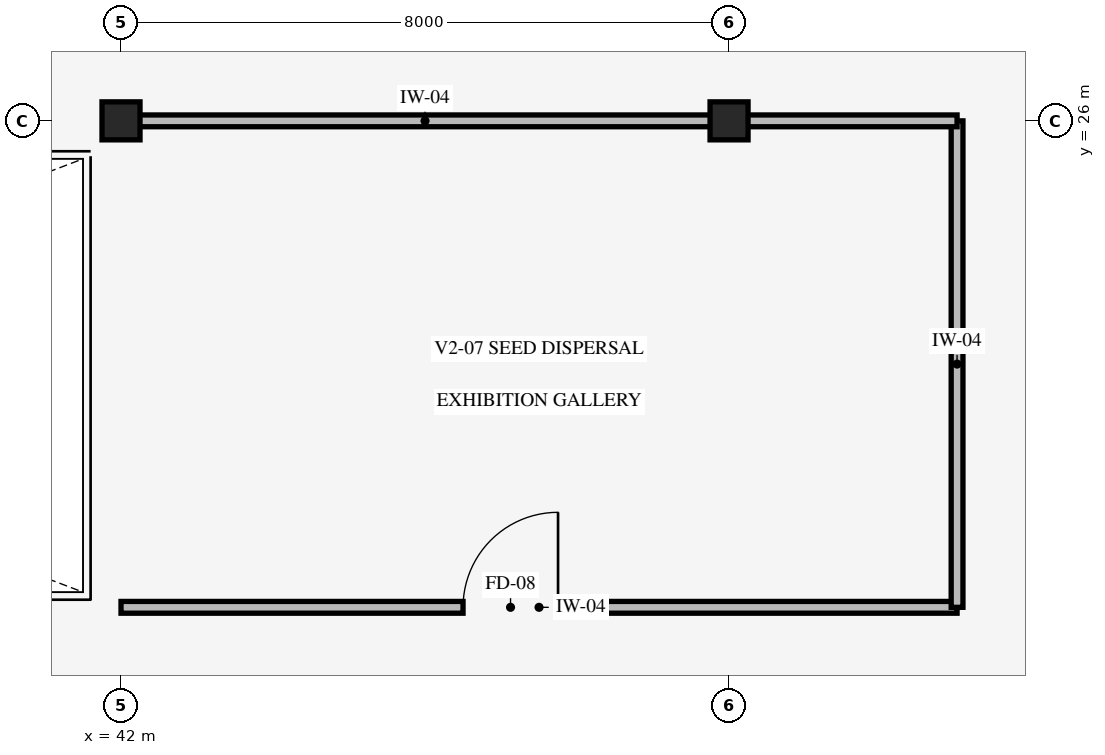
"""IFC4 building model, lengths in metres.
Left out: names, types, materials, properties, quantities, classifications, styles, units other than length and angle.
Written with IfcOpenShell. Run it as: python <this file> out.ifc"""

import sys

from ifc_helpers import new_model, si_unit, direction, frame, frame_2d, origin, origin_2d, place, context, subcontext, project, spatial, rectangle, extrude, element, fill, save


model = new_model("IFC4")
c1 = context("Model", 3, precision=1e-05, world=origin(), true_north=direction((0.0, 1.0)))
c2 = subcontext(c1, "Body", "Model", "MODEL_VIEW")
j1 = project(units=[si_unit("LENGTHUNIT", "METRE"), si_unit("PLANEANGLEUNIT", "RADIAN")], contexts=[c1])
p1 = place(None, origin())
s1 = spatial("IfcSite", under=j1, at=p1, CompositionType="ELEMENT")
p2 = place(p1, origin())
s2 = spatial("IfcBuilding", under=s1, at=p2, CompositionType="ELEMENT")
p3 = place(p2, frame((0.0, 0.0, 5.4)))
s3 = spatial("IfcBuildingStorey", under=s2, at=p3, CompositionType="ELEMENT", Elevation=5.4)
for number, where, z_axis, x_axis in (
    (1, (42.0, 26.0, 0.0), (0.0, 0.0, 1.0), (1.0, 0.0, 0.0)),
    (2, (50.0, 26.0, 0.0), (0.0, 0.0, 1.0), (1.0, 0.0, 0.0)),
):
    element("IfcColumn", number, at=place(p3, frame(where, z_axis=z_axis, x_axis=x_axis)), inside=s3, PredefinedType="COLUMN", context=c2, shape_type="SweptSolid", body=[
        extrude(rectangle(XDim=0.5, YDim=0.5, at=origin_2d()), origin(), (0.0, 0.0, 1.0), 4.8),
    ])
p4 = place(p3, frame((42.0, 19.6, 0.0), z_axis=(0.0, 0.0, 1.0), x_axis=(1.0, 0.0, 0.0)))
e3 = element("IfcWall", 3, at=p4, inside=s3, PredefinedType="STANDARD", context=c2, shape_type="SweptSolid", body=[
    extrude(rectangle(XDim=11.0, YDim=0.155, at=frame_2d((5.5, 0.0))), origin(), (0.0, 0.0, 1.0), 4.5),
])
p5 = place(p4, frame((4.5, 0.0, 0.0)))
e4 = element("IfcOpeningElement", 4, at=p5, cuts=e3, PredefinedType="OPENING", context=c2, shape_type="SweptSolid", body=[
    extrude(rectangle(XDim=1.25, YDim=2.15, at=frame_2d((0.625, 1.075))), frame((0.0, 0.087, 0.0), z_axis=(0.0, -1.0, 0.0), x_axis=(1.0, 0.0, 0.0)), (0.0, 0.0, 1.0), 0.175),
])
p6 = place(p3, frame((53.0, 19.6, 0.0), z_axis=(0.0, 0.0, 1.0), x_axis=(0.0, 1.0, 0.0)))
e5 = element("IfcWall", 5, at=p6, inside=s3, PredefinedType="STANDARD", context=c2, shape_type="SweptSolid", body=[
    extrude(rectangle(XDim=6.4, YDim=0.155, at=frame_2d((3.2, 0.0))), origin(), (0.0, 0.0, 1.0), 4.5),
])
p7 = place(p3, frame((42.0, 26.0, 0.0), z_axis=(0.0, 0.0, 1.0), x_axis=(1.0, 0.0, 0.0)))
e6 = element("IfcWall", 6, at=p7, inside=s3, PredefinedType="STANDARD", context=c2, shape_type="SweptSolid", body=[
    extrude(rectangle(XDim=11.0, YDim=0.155, at=frame_2d((5.5, 0.0))), origin(), (0.0, 0.0, 1.0), 3.94),
])
p8 = place(p5, origin())
e7 = element("IfcDoor", 7, at=p8, inside=s3, OperationType="SINGLE_SWING_RIGHT", PredefinedType="DOOR", context=c2, shape_type="SweptSolid", body=[
    extrude(rectangle(XDim=1.25, YDim=2.15, at=frame_2d((0.625, 1.075))), frame((0.0, 0.025, 0.0), z_axis=(0.0, -1.0, 0.0), x_axis=(1.0, 0.0, 0.0)), (0.0, 0.0, 1.0), 0.05),
])
fill(e4, e7)
save(model, sys.argv[1])
